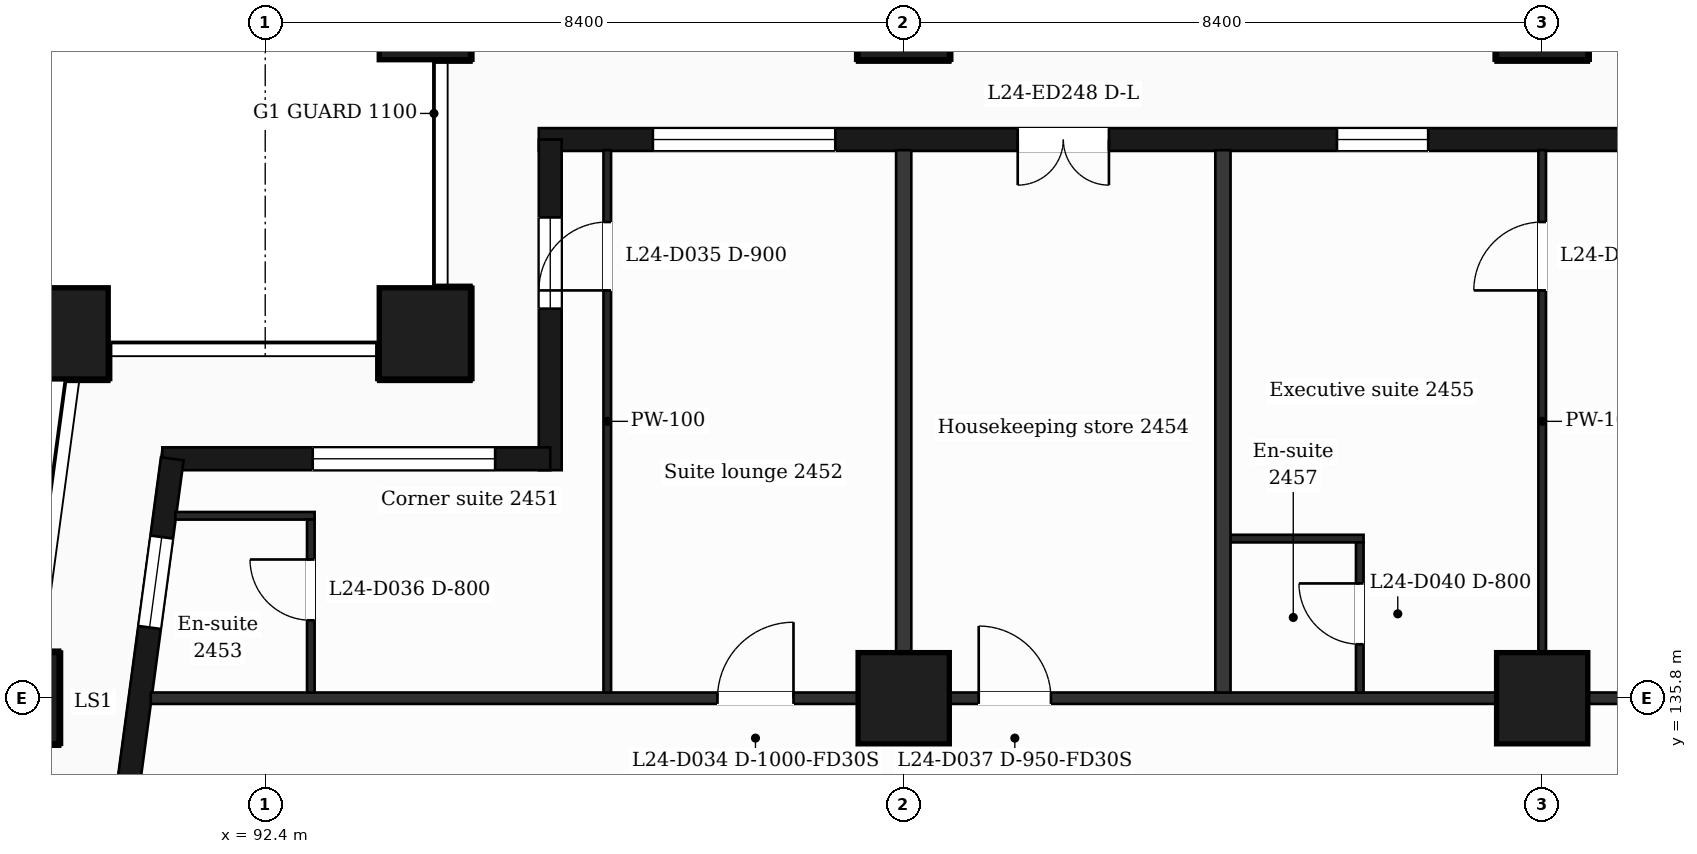
"""IFC4 building model, lengths in metres.
Left out: names, types, materials, properties, quantities, classifications, styles, units other than length and angle.
Written with IfcOpenShell. Run it as: python <this file> out.ifc"""

import sys

from ifc_helpers import new_model, si_unit, direction, frame, frame_2d, origin, origin_2d, place, context, subcontext, project, spatial, rectangle, extrude, element, fill, save


model = new_model("IFC4")
c1 = context("Model", 3, precision=1e-05, world=origin(), true_north=direction((0.0, 1.0)))
c2 = subcontext(c1, "Body", "Model", "MODEL_VIEW")
j1 = project(units=[si_unit("LENGTHUNIT", "METRE"), si_unit("PLANEANGLEUNIT", "RADIAN")], contexts=[c1])
p1 = place(None, origin())
s1 = spatial("IfcSite", under=j1, at=p1, CompositionType="ELEMENT")
p2 = place(p1, origin())
s2 = spatial("IfcBuilding", under=s1, at=p2, CompositionType="ELEMENT")
p3 = place(p2, frame((0.0, 0.0, 105.8)))
s3 = spatial("IfcBuildingStorey", under=s2, at=p3, CompositionType="ELEMENT", Elevation=105.8)
for number, where, z_axis, x_axis in (
    (1, (94.5, 140.6, 0.0), (0.0, 0.0, 1.0), (1.0, 0.0, 0.0)),
    (2, (89.735, 140.6, 0.0), (0.0, 0.0, 1.0), (1.0, 0.0, 0.0)),
    (3, (100.8, 135.8, 0.0), (0.0, 0.0, 1.0), (1.0, 0.0, 0.0)),
    (4, (109.2, 135.8, 0.0), (0.0, 0.0, 1.0), (1.0, 0.0, 0.0)),
    (5, (89.088, 135.8, 0.0), (0.0, 0.0, 1.0), (1.0, 0.0, 0.0)),
    (6, (100.8, 144.8, 0.0), (0.0, 0.0, 1.0), (1.0, 0.0, 0.0)),
    (7, (109.2, 144.8, 0.0), (0.0, 0.0, 1.0), (1.0, 0.0, 0.0)),
    (8, (94.5, 144.8, 0.0), (0.0, 0.0, 1.0), (1.0, 0.0, 0.0)),
):
    element("IfcColumn", number, at=place(p3, frame(where, z_axis=z_axis, x_axis=x_axis)), inside=s3, PredefinedType="COLUMN", context=c2, shape_type="SweptSolid", body=[
        extrude(rectangle(XDim=1.2, YDim=1.2, at=origin_2d()), origin(), (0.0, 0.0, 1.0), 3.7),
    ])
p4 = place(p3, frame((110.4, 143.15, 0.0), z_axis=(0.0, 0.0, 1.0), x_axis=(-1.0, 0.0, 0.0)))
e9 = element("IfcWall", 9, at=p4, inside=s3, PredefinedType="SOLIDWALL", context=c2, shape_type="SweptSolid", body=[
    extrude(rectangle(XDim=14.4, YDim=0.3, at=frame_2d((7.2, 0.0))), origin(), (0.0, 0.0, 1.0), 3.38),
])
p5 = place(p4, frame((2.7, 0.0, 0.9)))
e10 = element("IfcOpeningElement", 10, at=p5, cuts=e9, PredefinedType="OPENING", context=c2, shape_type="SweptSolid", body=[
    extrude(rectangle(XDim=1.2, YDim=2.1, at=frame_2d((0.6, 1.05))), frame((0.0, 0.16, 0.0), z_axis=(0.0, -1.0, 0.0), x_axis=(1.0, 0.0, 0.0)), (0.0, 0.0, 1.0), 0.32),
])
p6 = place(p4, frame((6.9, 0.0, 0.0)))
e11 = element("IfcOpeningElement", 11, at=p6, cuts=e9, PredefinedType="OPENING", context=c2, shape_type="SweptSolid", body=[
    extrude(rectangle(XDim=1.2, YDim=2.4, at=frame_2d((0.6, 1.2))), frame((0.0, 0.16, 0.0), z_axis=(0.0, -1.0, 0.0), x_axis=(1.0, 0.0, 0.0)), (0.0, 0.0, 1.0), 0.32),
])
p7 = place(p4, frame((10.5, 0.0, 0.9)))
e12 = element("IfcOpeningElement", 12, at=p7, cuts=e9, PredefinedType="OPENING", context=c2, shape_type="SweptSolid", body=[
    extrude(rectangle(XDim=2.4, YDim=2.1, at=frame_2d((1.2, 1.05))), frame((0.0, 0.16, 0.0), z_axis=(0.0, -1.0, 0.0), x_axis=(1.0, 0.0, 0.0)), (0.0, 0.0, 1.0), 0.32),
])
p8 = place(p3, frame((96.15, 143.15, 0.0), z_axis=(0.0, 0.0, 1.0), x_axis=(0.0, -1.0, 0.0)))
e13 = element("IfcWall", 13, at=p8, inside=s3, PredefinedType="SOLIDWALL", context=c2, shape_type="SweptSolid", body=[
    extrude(rectangle(XDim=4.35, YDim=0.3, at=frame_2d((2.175, 0.0))), origin(), (0.0, 0.0, 1.0), 3.38),
])
p9 = place(p8, frame((1.025, 0.0, 0.9)))
e14 = element("IfcOpeningElement", 14, at=p9, cuts=e13, PredefinedType="OPENING", context=c2, shape_type="SweptSolid", body=[
    extrude(rectangle(XDim=1.2, YDim=2.1, at=frame_2d((0.6, 1.05))), frame((0.0, 0.16, 0.0), z_axis=(0.0, -1.0, 0.0), x_axis=(1.0, 0.0, 0.0)), (0.0, 0.0, 1.0), 0.32),
])
p10 = place(p3, frame((96.15, 138.95, 0.0), z_axis=(0.0, 0.0, 1.0), x_axis=(-1.0, 0.0, 0.0)))
e15 = element("IfcWall", 15, at=p10, inside=s3, PredefinedType="SOLIDWALL", context=c2, shape_type="SweptSolid", body=[
    extrude(rectangle(XDim=5.104, YDim=0.3, at=frame_2d((2.552, 0.0))), origin(), (0.0, 0.0, 1.0), 3.38),
])
p11 = place(p10, frame((0.725, 0.0, 0.9)))
e16 = element("IfcOpeningElement", 16, at=p11, cuts=e15, PredefinedType="OPENING", context=c2, shape_type="SweptSolid", body=[
    extrude(rectangle(XDim=2.4, YDim=2.1, at=frame_2d((1.2, 1.05))), frame((0.0, 0.16, 0.0), z_axis=(0.0, -1.0, 0.0), x_axis=(1.0, 0.0, 0.0)), (0.0, 0.0, 1.0), 0.32),
])
p12 = place(p3, frame((91.177, 138.95, 0.0), z_axis=(0.0, 0.0, 1.0), x_axis=(-0.133426664613, -0.991058689065, 0.0)))
e17 = element("IfcWall", 17, at=p12, inside=s3, PredefinedType="SOLIDWALL", context=c2, shape_type="SweptSolid", body=[
    extrude(rectangle(XDim=6.609, YDim=0.3, at=frame_2d((3.305, 0.0))), origin(), (0.0, 0.0, 1.0), 3.38),
])
p13 = place(p12, frame((1.039, 0.0, 0.9)))
e18 = element("IfcOpeningElement", 18, at=p13, cuts=e17, PredefinedType="OPENING", context=c2, shape_type="SweptSolid", body=[
    extrude(rectangle(XDim=1.2, YDim=2.1, at=frame_2d((0.6, 1.05))), frame((0.0, 0.16, 0.0), z_axis=(0.0, -1.0, 0.0), x_axis=(1.0, 0.0, 0.0)), (0.0, 0.0, 1.0), 0.32),
])
p14 = place(p12, frame((4.294, 0.0, 0.0)))
e19 = element("IfcOpeningElement", 19, at=p14, cuts=e17, PredefinedType="OPENING", context=c2, shape_type="SweptSolid", body=[
    extrude(rectangle(XDim=1.2, YDim=2.4, at=frame_2d((0.6, 1.2))), frame((0.0, 0.16, 0.0), z_axis=(0.0, -1.0, 0.0), x_axis=(1.0, 0.0, 0.0)), (0.0, 0.0, 1.0), 0.32),
])
p15 = place(p3, frame((90.895, 135.8, 0.0), z_axis=(0.0, 0.0, 1.0), x_axis=(1.0, 0.0, 0.0)))
e20 = element("IfcWall", 20, at=p15, inside=s3, PredefinedType="PARTITIONING", context=c2, shape_type="SweptSolid", body=[
    extrude(rectangle(XDim=45.011, YDim=0.15, at=frame_2d((22.505, 0.0))), origin(), (0.0, 0.0, 1.0), 3.38),
])
p16 = place(p15, frame((7.455, 0.0, 0.0)))
e21 = element("IfcOpeningElement", 21, at=p16, cuts=e20, PredefinedType="OPENING", context=c2, shape_type="SweptSolid", body=[
    extrude(rectangle(XDim=1.0, YDim=2.1, at=frame_2d((0.5, 1.05))), frame((0.0, 0.085, 0.0), z_axis=(0.0, -1.0, 0.0), x_axis=(1.0, 0.0, 0.0)), (0.0, 0.0, 1.0), 0.17),
])
p17 = place(p15, frame((10.892, 0.0, 0.0)))
e22 = element("IfcOpeningElement", 22, at=p17, cuts=e20, PredefinedType="OPENING", context=c2, shape_type="SweptSolid", body=[
    extrude(rectangle(XDim=0.95, YDim=2.1, at=frame_2d((0.475, 1.05))), frame((0.0, 0.085, 0.0), z_axis=(0.0, -1.0, 0.0), x_axis=(1.0, 0.0, 0.0)), (0.0, 0.0, 1.0), 0.17),
])
p18 = place(p15, frame((23.68, 0.0, 0.0)))
e23 = element("IfcOpeningElement", 23, at=p18, cuts=e20, PredefinedType="OPENING", context=c2, shape_type="SweptSolid", body=[
    extrude(rectangle(XDim=1.0, YDim=2.1, at=frame_2d((0.5, 1.05))), frame((0.0, 0.085, 0.0), z_axis=(0.0, -1.0, 0.0), x_axis=(1.0, 0.0, 0.0)), (0.0, 0.0, 1.0), 0.17),
])
p19 = place(p15, frame((30.318, 0.0, 0.0)))
e24 = element("IfcOpeningElement", 24, at=p19, cuts=e20, PredefinedType="OPENING", context=c2, shape_type="SweptSolid", body=[
    extrude(rectangle(XDim=0.95, YDim=2.1, at=frame_2d((0.475, 1.05))), frame((0.0, 0.085, 0.0), z_axis=(0.0, -1.0, 0.0), x_axis=(1.0, 0.0, 0.0)), (0.0, 0.0, 1.0), 0.17),
])
p20 = place(p15, frame((36.355, 0.0, 0.0)))
e25 = element("IfcOpeningElement", 25, at=p20, cuts=e20, PredefinedType="OPENING", context=c2, shape_type="SweptSolid", body=[
    extrude(rectangle(XDim=1.0, YDim=2.1, at=frame_2d((0.5, 1.05))), frame((0.0, 0.085, 0.0), z_axis=(0.0, -1.0, 0.0), x_axis=(1.0, 0.0, 0.0)), (0.0, 0.0, 1.0), 0.17),
])
p21 = place(p3, frame((105.0, 137.9, 0.0), z_axis=(0.0, 0.0, 1.0), x_axis=(1.0, 0.0, 0.0)))
e26 = element("IfcWall", 26, at=p21, inside=s3, PredefinedType="PARTITIONING", context=c2, shape_type="SweptSolid", body=[
    extrude(rectangle(XDim=1.85, YDim=0.1, at=frame_2d((0.925, 0.0))), origin(), (0.0, 0.0, 1.0), 3.38),
])
p22 = place(p3, frame((91.218, 138.2, 0.0), z_axis=(0.0, 0.0, 1.0), x_axis=(1.0, 0.0, 0.0)))
e27 = element("IfcWall", 27, at=p22, inside=s3, PredefinedType="PARTITIONING", context=c2, shape_type="SweptSolid", body=[
    extrude(rectangle(XDim=1.832, YDim=0.1, at=frame_2d((0.916, 0.0))), origin(), (0.0, 0.0, 1.0), 3.38),
])
p23 = place(p3, frame((93.0, 135.875, 0.0), z_axis=(0.0, 0.0, 1.0), x_axis=(0.0, 1.0, 0.0)))
e28 = element("IfcWall", 28, at=p23, inside=s3, PredefinedType="PARTITIONING", context=c2, shape_type="SweptSolid", body=[
    extrude(rectangle(XDim=2.275, YDim=0.1, at=frame_2d((1.137, 0.0))), origin(), (0.0, 0.0, 1.0), 3.38),
])
p24 = place(p23, frame((0.95, 0.0, 0.0)))
e29 = element("IfcOpeningElement", 29, at=p24, cuts=e28, PredefinedType="OPENING", context=c2, shape_type="SweptSolid", body=[
    extrude(rectangle(XDim=0.8, YDim=2.1, at=frame_2d((0.4, 1.05))), frame((0.0, 0.06, 0.0), z_axis=(0.0, -1.0, 0.0), x_axis=(1.0, 0.0, 0.0)), (0.0, 0.0, 1.0), 0.12),
])
p25 = place(p3, frame((96.9, 135.875, 0.0), z_axis=(0.0, 0.0, 1.0), x_axis=(0.0, 1.0, 0.0)))
e30 = element("IfcWall", 30, at=p25, inside=s3, PredefinedType="PARTITIONING", context=c2, shape_type="SweptSolid", body=[
    extrude(rectangle(XDim=7.135, YDim=0.1, at=frame_2d((3.567, 0.0))), origin(), (0.0, 0.0, 1.0), 3.38),
])
p26 = place(p25, frame((5.29, 0.0, 0.0)))
e31 = element("IfcOpeningElement", 31, at=p26, cuts=e30, PredefinedType="OPENING", context=c2, shape_type="SweptSolid", body=[
    extrude(rectangle(XDim=0.9, YDim=2.1, at=frame_2d((0.45, 1.05))), frame((0.0, 0.06, 0.0), z_axis=(0.0, -1.0, 0.0), x_axis=(1.0, 0.0, 0.0)), (0.0, 0.0, 1.0), 0.12),
])
for number, where, z_axis, x_axis in (
    (32, (100.8, 135.875, 0.0), (0.0, 0.0, 1.0), (0.0, 1.0, 0.0)),
    (33, (105.0, 135.875, 0.0), (0.0, 0.0, 1.0), (0.0, 1.0, 0.0)),
):
    element("IfcWall", number, at=place(p3, frame(where, z_axis=z_axis, x_axis=x_axis)), inside=s3, PredefinedType="PARTITIONING", context=c2, shape_type="SweptSolid", body=[
        extrude(rectangle(XDim=7.135, YDim=0.2, at=frame_2d((3.567, 0.0))), origin(), (0.0, 0.0, 1.0), 3.38),
    ])
p27 = place(p3, frame((106.8, 135.875, 0.0), z_axis=(0.0, 0.0, 1.0), x_axis=(0.0, 1.0, 0.0)))
e34 = element("IfcWall", 34, at=p27, inside=s3, PredefinedType="PARTITIONING", context=c2, shape_type="SweptSolid", body=[
    extrude(rectangle(XDim=1.975, YDim=0.1, at=frame_2d((0.988, 0.0))), origin(), (0.0, 0.0, 1.0), 3.38),
])
p28 = place(p27, frame((0.635, 0.0, 0.0)))
e35 = element("IfcOpeningElement", 35, at=p28, cuts=e34, PredefinedType="OPENING", context=c2, shape_type="SweptSolid", body=[
    extrude(rectangle(XDim=0.8, YDim=2.1, at=frame_2d((0.4, 1.05))), frame((0.0, 0.06, 0.0), z_axis=(0.0, -1.0, 0.0), x_axis=(1.0, 0.0, 0.0)), (0.0, 0.0, 1.0), 0.12),
])
p29 = place(p3, frame((109.2, 135.875, 0.0), z_axis=(0.0, 0.0, 1.0), x_axis=(0.0, 1.0, 0.0)))
e36 = element("IfcWall", 36, at=p29, inside=s3, PredefinedType="PARTITIONING", context=c2, shape_type="SweptSolid", body=[
    extrude(rectangle(XDim=7.135, YDim=0.1, at=frame_2d((3.567, 0.0))), origin(), (0.0, 0.0, 1.0), 3.38),
])
p30 = place(p29, frame((5.29, 0.0, 0.0)))
e37 = element("IfcOpeningElement", 37, at=p30, cuts=e36, PredefinedType="OPENING", context=c2, shape_type="SweptSolid", body=[
    extrude(rectangle(XDim=0.9, YDim=2.1, at=frame_2d((0.45, 1.05))), frame((0.0, 0.06, 0.0), z_axis=(0.0, -1.0, 0.0), x_axis=(1.0, 0.0, 0.0)), (0.0, 0.0, 1.0), 0.12),
])
p31 = place(p5, origin())
e38 = element("IfcWindow", 38, at=p31, inside=s3, PartitioningType="SINGLE_PANEL", PredefinedType="WINDOW", context=c2, shape_type="SweptSolid", body=[
    extrude(rectangle(XDim=1.2, YDim=2.1, at=frame_2d((0.6, 1.05))), frame((0.0, 0.03, 0.0), z_axis=(0.0, -1.0, 0.0), x_axis=(1.0, 0.0, 0.0)), (0.0, 0.0, 1.0), 0.06),
])
fill(e10, e38)
p32 = place(p6, origin())
e39 = element("IfcDoor", 39, at=p32, inside=s3, OperationType="DOUBLE_DOOR_SINGLE_SWING", PredefinedType="DOOR", context=c2, shape_type="SweptSolid", body=[
    extrude(rectangle(XDim=1.2, YDim=2.4, at=frame_2d((0.6, 1.2))), frame((0.0, 0.025, 0.0), z_axis=(0.0, -1.0, 0.0), x_axis=(1.0, 0.0, 0.0)), (0.0, 0.0, 1.0), 0.05),
])
fill(e11, e39)
p33 = place(p7, origin())
e40 = element("IfcWindow", 40, at=p33, inside=s3, PartitioningType="SINGLE_PANEL", PredefinedType="WINDOW", context=c2, shape_type="SweptSolid", body=[
    extrude(rectangle(XDim=2.4, YDim=2.1, at=frame_2d((1.2, 1.05))), frame((0.0, 0.03, 0.0), z_axis=(0.0, -1.0, 0.0), x_axis=(1.0, 0.0, 0.0)), (0.0, 0.0, 1.0), 0.06),
])
fill(e12, e40)
p34 = place(p9, origin())
e41 = element("IfcWindow", 41, at=p34, inside=s3, PartitioningType="SINGLE_PANEL", PredefinedType="WINDOW", context=c2, shape_type="SweptSolid", body=[
    extrude(rectangle(XDim=1.2, YDim=2.1, at=frame_2d((0.6, 1.05))), frame((0.0, 0.03, 0.0), z_axis=(0.0, -1.0, 0.0), x_axis=(1.0, 0.0, 0.0)), (0.0, 0.0, 1.0), 0.06),
])
fill(e14, e41)
p35 = place(p11, origin())
e42 = element("IfcWindow", 42, at=p35, inside=s3, PartitioningType="SINGLE_PANEL", PredefinedType="WINDOW", context=c2, shape_type="SweptSolid", body=[
    extrude(rectangle(XDim=2.4, YDim=2.1, at=frame_2d((1.2, 1.05))), frame((0.0, 0.03, 0.0), z_axis=(0.0, -1.0, 0.0), x_axis=(1.0, 0.0, 0.0)), (0.0, 0.0, 1.0), 0.06),
])
fill(e16, e42)
p36 = place(p13, origin())
e43 = element("IfcWindow", 43, at=p36, inside=s3, PartitioningType="SINGLE_PANEL", PredefinedType="WINDOW", context=c2, shape_type="SweptSolid", body=[
    extrude(rectangle(XDim=1.2, YDim=2.1, at=frame_2d((0.6, 1.05))), frame((0.0, 0.03, 0.0), z_axis=(0.0, -1.0, 0.0), x_axis=(1.0, 0.0, 0.0)), (0.0, 0.0, 1.0), 0.06),
])
fill(e18, e43)
p37 = place(p16, origin())
e44 = element("IfcDoor", 44, at=p37, inside=s3, OperationType="SINGLE_SWING_RIGHT", PredefinedType="DOOR", context=c2, shape_type="SweptSolid", body=[
    extrude(rectangle(XDim=1.0, YDim=2.1, at=frame_2d((0.5, 1.05))), frame((0.0, 0.025, 0.0), z_axis=(0.0, -1.0, 0.0), x_axis=(1.0, 0.0, 0.0)), (0.0, 0.0, 1.0), 0.05),
])
fill(e21, e44)
p38 = place(p26, origin())
e45 = element("IfcDoor", 45, at=p38, inside=s3, OperationType="SINGLE_SWING_LEFT", PredefinedType="DOOR", context=c2, shape_type="SweptSolid", body=[
    extrude(rectangle(XDim=0.9, YDim=2.1, at=frame_2d((0.45, 1.05))), frame((0.0, 0.025, 0.0), z_axis=(0.0, -1.0, 0.0), x_axis=(1.0, 0.0, 0.0)), (0.0, 0.0, 1.0), 0.05),
])
fill(e31, e45)
p39 = place(p24, origin())
e46 = element("IfcDoor", 46, at=p39, inside=s3, OperationType="SINGLE_SWING_RIGHT", PredefinedType="DOOR", context=c2, shape_type="SweptSolid", body=[
    extrude(rectangle(XDim=0.8, YDim=2.1, at=frame_2d((0.4, 1.05))), frame((0.0, 0.025, 0.0), z_axis=(0.0, -1.0, 0.0), x_axis=(1.0, 0.0, 0.0)), (0.0, 0.0, 1.0), 0.05),
])
fill(e29, e46)
p40 = place(p17, origin())
e47 = element("IfcDoor", 47, at=p40, inside=s3, OperationType="SINGLE_SWING_LEFT", PredefinedType="DOOR", context=c2, shape_type="SweptSolid", body=[
    extrude(rectangle(XDim=0.95, YDim=2.1, at=frame_2d((0.475, 1.05))), frame((0.0, 0.025, 0.0), z_axis=(0.0, -1.0, 0.0), x_axis=(1.0, 0.0, 0.0)), (0.0, 0.0, 1.0), 0.05),
])
fill(e22, e47)
p41 = place(p30, origin())
e48 = element("IfcDoor", 48, at=p41, inside=s3, OperationType="SINGLE_SWING_LEFT", PredefinedType="DOOR", context=c2, shape_type="SweptSolid", body=[
    extrude(rectangle(XDim=0.9, YDim=2.1, at=frame_2d((0.45, 1.05))), frame((0.0, 0.025, 0.0), z_axis=(0.0, -1.0, 0.0), x_axis=(1.0, 0.0, 0.0)), (0.0, 0.0, 1.0), 0.05),
])
fill(e37, e48)
p42 = place(p28, origin())
e49 = element("IfcDoor", 49, at=p42, inside=s3, OperationType="SINGLE_SWING_RIGHT", PredefinedType="DOOR", context=c2, shape_type="SweptSolid", body=[
    extrude(rectangle(XDim=0.8, YDim=2.1, at=frame_2d((0.4, 1.05))), frame((0.0, 0.025, 0.0), z_axis=(0.0, -1.0, 0.0), x_axis=(1.0, 0.0, 0.0)), (0.0, 0.0, 1.0), 0.05),
])
fill(e35, e49)
save(model, sys.argv[1])
